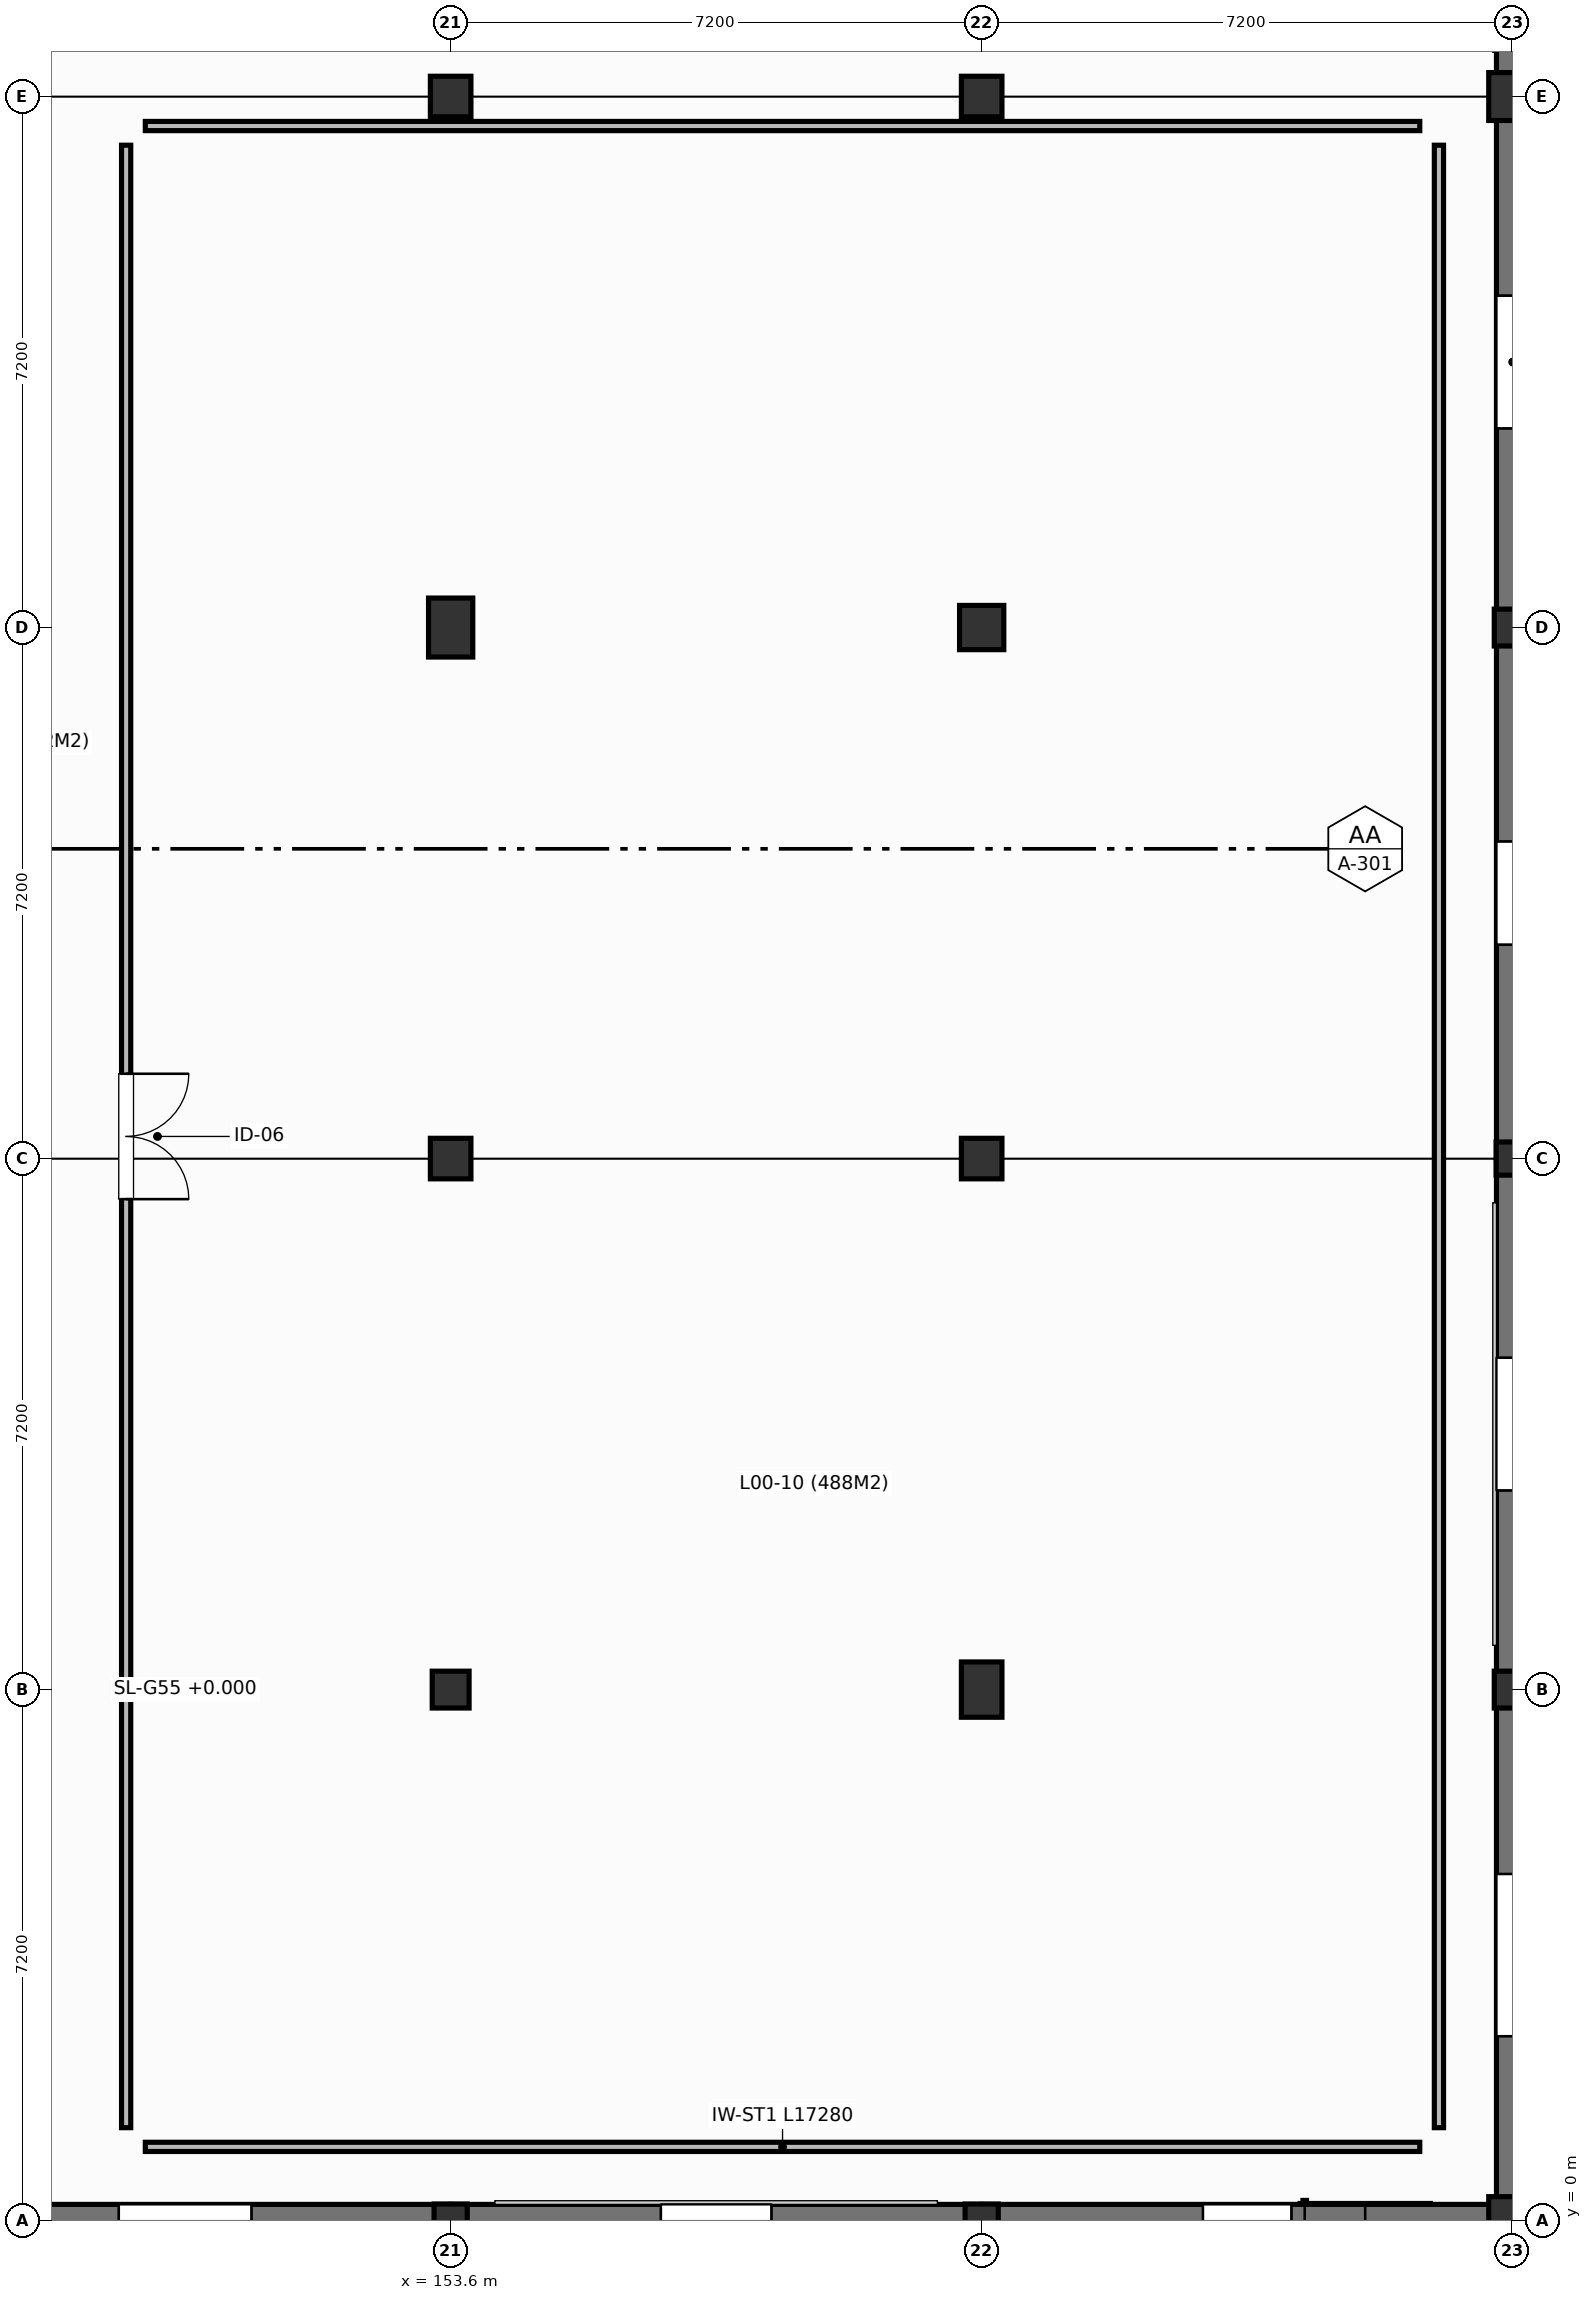
"""IFC4 building model, lengths in metres.
Left out: names, types, materials, properties, quantities, classifications, styles, units other than length and angle.
Written with IfcOpenShell. Run it as: python <this file> out.ifc"""

import sys

from ifc_helpers import new_model, si_unit, direction, frame, frame_2d, origin, origin_2d, place, context, subcontext, project, spatial, rectangle, circle, extrude, element, fill, save


model = new_model("IFC4")
c1 = context("Model", 3, precision=1e-05, world=origin(), true_north=direction((0.0, 1.0)))
c2 = subcontext(c1, "Body", "Model", "MODEL_VIEW")
j1 = project(units=[si_unit("LENGTHUNIT", "METRE"), si_unit("PLANEANGLEUNIT", "RADIAN")], contexts=[c1])
p1 = place(None, origin())
s1 = spatial("IfcSite", under=j1, at=p1, CompositionType="ELEMENT")
p2 = place(p1, origin())
s2 = spatial("IfcBuilding", under=s1, at=p2, CompositionType="ELEMENT")
p3 = place(p2, origin())
s3 = spatial("IfcBuildingStorey", under=s2, at=p3, CompositionType="ELEMENT", Elevation=0.0)
p4 = place(p3, frame((153.6, 0.0, 0.0), z_axis=(0.0, 0.0, 1.0), x_axis=(1.0, 0.0, 0.0)))
e1 = element("IfcColumn", 1, at=p4, inside=s3, PredefinedType="COLUMN", context=c2, shape_type="SweptSolid", body=[
    extrude(rectangle(XDim=0.45, YDim=0.45, at=origin_2d()), origin(), (0.0, 0.0, 1.0), 4.8),
])
p5 = place(p3, frame((153.6, 7.2, 0.0), z_axis=(0.0, 0.0, 1.0), x_axis=(1.0, 0.0, 0.0)))
e2 = element("IfcColumn", 2, at=p5, inside=s3, PredefinedType="COLUMN", context=c2, shape_type="SweptSolid", body=[
    extrude(rectangle(XDim=0.5, YDim=0.5, at=origin_2d()), origin(), (0.0, 0.0, 1.0), 4.8),
])
p6 = place(p3, frame((153.6, 14.4, 0.0), z_axis=(0.0, 0.0, 1.0), x_axis=(1.0, 0.0, 0.0)))
e3 = element("IfcColumn", 3, at=p6, inside=s3, PredefinedType="COLUMN", context=c2, shape_type="SweptSolid", body=[
    extrude(rectangle(XDim=0.55, YDim=0.55, at=origin_2d()), origin(), (0.0, 0.0, 1.0), 4.8),
])
p7 = place(p3, frame((153.6, 21.6, 0.0), z_axis=(0.0, 0.0, 1.0), x_axis=(1.0, 0.0, 0.0)))
e4 = element("IfcColumn", 4, at=p7, inside=s3, PredefinedType="COLUMN", context=c2, shape_type="SweptSolid", body=[
    extrude(rectangle(XDim=0.6, YDim=0.8, at=origin_2d()), origin(), (0.0, 0.0, 1.0), 4.8),
])
p8 = place(p3, frame((153.6, 28.8, 0.0), z_axis=(0.0, 0.0, 1.0), x_axis=(1.0, 0.0, 0.0)))
e5 = element("IfcColumn", 5, at=p8, inside=s3, PredefinedType="COLUMN", context=c2, shape_type="SweptSolid", body=[
    extrude(rectangle(XDim=0.55, YDim=0.55, at=origin_2d()), origin(), (0.0, 0.0, 1.0), 4.8),
])
p9 = place(p3, frame((160.8, 0.0, 0.0), z_axis=(0.0, 0.0, 1.0), x_axis=(1.0, 0.0, 0.0)))
e6 = element("IfcColumn", 6, at=p9, inside=s3, PredefinedType="COLUMN", context=c2, shape_type="SweptSolid", body=[
    extrude(rectangle(XDim=0.45, YDim=0.45, at=origin_2d()), origin(), (0.0, 0.0, 1.0), 4.8),
])
p10 = place(p3, frame((160.8, 7.2, 0.0), z_axis=(0.0, 0.0, 1.0), x_axis=(1.0, 0.0, 0.0)))
e7 = element("IfcColumn", 7, at=p10, inside=s3, PredefinedType="COLUMN", context=c2, shape_type="SweptSolid", body=[
    extrude(rectangle(XDim=0.55, YDim=0.75, at=origin_2d()), origin(), (0.0, 0.0, 1.0), 4.8),
])
p11 = place(p3, frame((160.8, 14.4, 0.0), z_axis=(0.0, 0.0, 1.0), x_axis=(1.0, 0.0, 0.0)))
e8 = element("IfcColumn", 8, at=p11, inside=s3, PredefinedType="COLUMN", context=c2, shape_type="SweptSolid", body=[
    extrude(rectangle(XDim=0.55, YDim=0.55, at=origin_2d()), origin(), (0.0, 0.0, 1.0), 4.8),
])
p12 = place(p3, frame((160.8, 21.6, 0.0), z_axis=(0.0, 0.0, 1.0), x_axis=(1.0, 0.0, 0.0)))
e9 = element("IfcColumn", 9, at=p12, inside=s3, PredefinedType="COLUMN", context=c2, shape_type="SweptSolid", body=[
    extrude(rectangle(XDim=0.6, YDim=0.6, at=origin_2d()), origin(), (0.0, 0.0, 1.0), 4.8),
])
p13 = place(p3, frame((160.8, 28.8, 0.0), z_axis=(0.0, 0.0, 1.0), x_axis=(1.0, 0.0, 0.0)))
e10 = element("IfcColumn", 10, at=p13, inside=s3, PredefinedType="COLUMN", context=c2, shape_type="SweptSolid", body=[
    extrude(rectangle(XDim=0.55, YDim=0.55, at=origin_2d()), origin(), (0.0, 0.0, 1.0), 4.8),
])
p14 = place(p3, frame((168.0, 0.0, 0.0), z_axis=(0.0, 0.0, 1.0), x_axis=(1.0, 0.0, 0.0)))
e11 = element("IfcColumn", 11, at=p14, inside=s3, PredefinedType="COLUMN", context=c2, shape_type="SweptSolid", body=[
    extrude(circle(Radius=0.325, at=origin_2d()), origin(), (0.0, 0.0, 1.0), 4.8),
])
p15 = place(p3, frame((168.0, 7.2, 0.0), z_axis=(0.0, 0.0, 1.0), x_axis=(1.0, 0.0, 0.0)))
e12 = element("IfcColumn", 12, at=p15, inside=s3, PredefinedType="COLUMN", context=c2, shape_type="SweptSolid", body=[
    extrude(rectangle(XDim=0.5, YDim=0.5, at=origin_2d()), origin(), (0.0, 0.0, 1.0), 4.8),
])
p16 = place(p3, frame((168.0, 14.4, 0.0), z_axis=(0.0, 0.0, 1.0), x_axis=(1.0, 0.0, 0.0)))
e13 = element("IfcColumn", 13, at=p16, inside=s3, PredefinedType="COLUMN", context=c2, shape_type="SweptSolid", body=[
    extrude(rectangle(XDim=0.45, YDim=0.45, at=origin_2d()), origin(), (0.0, 0.0, 1.0), 4.8),
])
p17 = place(p3, frame((168.0, 21.6, 0.0), z_axis=(0.0, 0.0, 1.0), x_axis=(1.0, 0.0, 0.0)))
e14 = element("IfcColumn", 14, at=p17, inside=s3, PredefinedType="COLUMN", context=c2, shape_type="SweptSolid", body=[
    extrude(rectangle(XDim=0.5, YDim=0.5, at=origin_2d()), origin(), (0.0, 0.0, 1.0), 4.8),
])
p18 = place(p3, frame((168.0, 28.8, 0.0), z_axis=(0.0, 0.0, 1.0), x_axis=(1.0, 0.0, 0.0)))
e15 = element("IfcColumn", 15, at=p18, inside=s3, PredefinedType="COLUMN", context=c2, shape_type="SweptSolid", body=[
    extrude(circle(Radius=0.325, at=origin_2d()), origin(), (0.0, 0.0, 1.0), 4.8),
])
p19 = place(p3, frame((168.0, 36.0, 0.0), z_axis=(0.0, 0.0, 1.0), x_axis=(0.0, -1.0, 0.0)))
e16 = element("IfcWall", 16, at=p19, inside=s3, PredefinedType="STANDARD", context=c2, shape_type="SweptSolid", body=[
    extrude(rectangle(XDim=7.2, YDim=0.44, at=frame_2d((3.6, 0.0))), origin(), (0.0, 0.0, 1.0), 4.44),
])
p20 = place(p19, frame((2.85, 0.0, 0.8)))
e17 = element("IfcOpeningElement", 17, at=p20, cuts=e16, PredefinedType="OPENING", context=c2, shape_type="SweptSolid", body=[
    extrude(rectangle(XDim=1.5, YDim=1.65, at=frame_2d((0.75, 0.825))), frame((0.0, 0.23, 0.0), z_axis=(0.0, -1.0, 0.0), x_axis=(1.0, 0.0, 0.0)), (0.0, 0.0, 1.0), 0.46),
])
p21 = place(p3, frame((168.0, 28.8, 0.0), z_axis=(0.0, 0.0, 1.0), x_axis=(0.0, -1.0, 0.0)))
e18 = element("IfcWall", 18, at=p21, inside=s3, PredefinedType="STANDARD", context=c2, shape_type="SweptSolid", body=[
    extrude(rectangle(XDim=7.2, YDim=0.44, at=frame_2d((3.6, 0.0))), origin(), (0.0, 0.0, 1.0), 4.44),
])
p22 = place(p21, frame((2.7, 0.0, 0.8)))
e19 = element("IfcOpeningElement", 19, at=p22, cuts=e18, PredefinedType="OPENING", context=c2, shape_type="SweptSolid", body=[
    extrude(rectangle(XDim=1.8, YDim=1.65, at=frame_2d((0.9, 0.825))), frame((0.0, 0.23, 0.0), z_axis=(0.0, -1.0, 0.0), x_axis=(1.0, 0.0, 0.0)), (0.0, 0.0, 1.0), 0.46),
])
p23 = place(p3, frame((168.0, 21.6, 0.0), z_axis=(0.0, 0.0, 1.0), x_axis=(0.0, -1.0, 0.0)))
e20 = element("IfcWall", 20, at=p23, inside=s3, PredefinedType="STANDARD", context=c2, shape_type="SweptSolid", body=[
    extrude(rectangle(XDim=7.2, YDim=0.44, at=frame_2d((3.6, 0.0))), origin(), (0.0, 0.0, 1.0), 4.44),
])
p24 = place(p23, frame((2.9, 0.0, 0.8)))
e21 = element("IfcOpeningElement", 21, at=p24, cuts=e20, PredefinedType="OPENING", context=c2, shape_type="SweptSolid", body=[
    extrude(rectangle(XDim=1.4, YDim=2.05, at=frame_2d((0.7, 1.025))), frame((0.0, 0.23, 0.0), z_axis=(0.0, -1.0, 0.0), x_axis=(1.0, 0.0, 0.0)), (0.0, 0.0, 1.0), 0.46),
])
p25 = place(p3, frame((168.0, 14.4, 0.0), z_axis=(0.0, 0.0, 1.0), x_axis=(0.0, -1.0, 0.0)))
e22 = element("IfcWall", 22, at=p25, inside=s3, PredefinedType="STANDARD", context=c2, shape_type="SweptSolid", body=[
    extrude(rectangle(XDim=7.2, YDim=0.44, at=frame_2d((3.6, 0.0))), origin(), (0.0, 0.0, 1.0), 4.44),
])
p26 = place(p25, frame((2.7, 0.0, 0.8)))
e23 = element("IfcOpeningElement", 23, at=p26, cuts=e22, PredefinedType="OPENING", context=c2, shape_type="SweptSolid", body=[
    extrude(rectangle(XDim=1.8, YDim=2.05, at=frame_2d((0.9, 1.025))), frame((0.0, 0.23, 0.0), z_axis=(0.0, -1.0, 0.0), x_axis=(1.0, 0.0, 0.0)), (0.0, 0.0, 1.0), 0.46),
])
p27 = place(p3, frame((168.0, 7.2, 0.0), z_axis=(0.0, 0.0, 1.0), x_axis=(0.0, -1.0, 0.0)))
e24 = element("IfcWall", 24, at=p27, inside=s3, PredefinedType="STANDARD", context=c2, shape_type="SweptSolid", body=[
    extrude(rectangle(XDim=7.2, YDim=0.44, at=frame_2d((3.6, 0.0))), origin(), (0.0, 0.0, 1.0), 4.44),
])
p28 = place(p27, frame((2.5, 0.0, 0.8)))
e25 = element("IfcOpeningElement", 25, at=p28, cuts=e24, PredefinedType="OPENING", context=c2, shape_type="SweptSolid", body=[
    extrude(rectangle(XDim=2.2, YDim=2.05, at=frame_2d((1.1, 1.025))), frame((0.0, 0.23, 0.0), z_axis=(0.0, -1.0, 0.0), x_axis=(1.0, 0.0, 0.0)), (0.0, 0.0, 1.0), 0.46),
])
p29 = place(p3, frame((168.0, 0.0, 0.0), z_axis=(0.0, 0.0, 1.0), x_axis=(-1.0, 0.0, 0.0)))
e26 = element("IfcWall", 26, at=p29, inside=s3, PredefinedType="STANDARD", context=c2, shape_type="SweptSolid", body=[
    extrude(rectangle(XDim=7.2, YDim=0.44, at=frame_2d((3.6, 0.0))), origin(), (0.0, 0.0, 1.0), 4.44),
])
p30 = place(p29, frame((3.0, 0.0, 0.8)))
e27 = element("IfcOpeningElement", 27, at=p30, cuts=e26, PredefinedType="OPENING", context=c2, shape_type="SweptSolid", body=[
    extrude(rectangle(XDim=1.2, YDim=1.65, at=frame_2d((0.6, 0.825))), frame((0.0, 0.23, 0.0), z_axis=(0.0, -1.0, 0.0), x_axis=(1.0, 0.0, 0.0)), (0.0, 0.0, 1.0), 0.46),
])
p31 = place(p3, frame((160.8, 0.0, 0.0), z_axis=(0.0, 0.0, 1.0), x_axis=(-1.0, 0.0, 0.0)))
e28 = element("IfcWall", 28, at=p31, inside=s3, PredefinedType="STANDARD", context=c2, shape_type="SweptSolid", body=[
    extrude(rectangle(XDim=7.2, YDim=0.44, at=frame_2d((3.6, 0.0))), origin(), (0.0, 0.0, 1.0), 4.44),
])
p32 = place(p31, frame((2.85, 0.0, 0.8)))
e29 = element("IfcOpeningElement", 29, at=p32, cuts=e28, PredefinedType="OPENING", context=c2, shape_type="SweptSolid", body=[
    extrude(rectangle(XDim=1.5, YDim=1.65, at=frame_2d((0.75, 0.825))), frame((0.0, 0.23, 0.0), z_axis=(0.0, -1.0, 0.0), x_axis=(1.0, 0.0, 0.0)), (0.0, 0.0, 1.0), 0.46),
])
p33 = place(p3, frame((153.6, 0.0, 0.0), z_axis=(0.0, 0.0, 1.0), x_axis=(-1.0, 0.0, 0.0)))
e30 = element("IfcWall", 30, at=p33, inside=s3, PredefinedType="STANDARD", context=c2, shape_type="SweptSolid", body=[
    extrude(rectangle(XDim=7.2, YDim=0.44, at=frame_2d((3.6, 0.0))), origin(), (0.0, 0.0, 1.0), 4.44),
])
p34 = place(p33, frame((2.7, 0.0, 0.8)))
e31 = element("IfcOpeningElement", 31, at=p34, cuts=e30, PredefinedType="OPENING", context=c2, shape_type="SweptSolid", body=[
    extrude(rectangle(XDim=1.8, YDim=1.65, at=frame_2d((0.9, 0.825))), frame((0.0, 0.23, 0.0), z_axis=(0.0, -1.0, 0.0), x_axis=(1.0, 0.0, 0.0)), (0.0, 0.0, 1.0), 0.46),
])
p35 = place(p3, frame((149.46, 1.0, 0.0), z_axis=(0.0, 0.0, 1.0), x_axis=(1.0, 0.0, 0.0)))
e32 = element("IfcWall", 32, at=p35, inside=s3, PredefinedType="PARTITIONING", context=c2, shape_type="SweptSolid", body=[
    extrude(rectangle(XDim=17.28, YDim=0.125, at=frame_2d((8.64, 0.0))), origin(), (0.0, 0.0, 1.0), 4.44),
])
p36 = place(p3, frame((167.0, 1.26, 0.0), z_axis=(0.0, 0.0, 1.0), x_axis=(0.0, 1.0, 0.0)))
e33 = element("IfcWall", 33, at=p36, inside=s3, PredefinedType="PARTITIONING", context=c2, shape_type="SweptSolid", body=[
    extrude(rectangle(XDim=26.88, YDim=0.125, at=frame_2d((13.44, 0.0))), origin(), (0.0, 0.0, 1.0), 4.44),
])
p37 = place(p3, frame((166.74, 28.4, 0.0), z_axis=(0.0, 0.0, 1.0), x_axis=(-1.0, 0.0, 0.0)))
e34 = element("IfcWall", 34, at=p37, inside=s3, PredefinedType="PARTITIONING", context=c2, shape_type="SweptSolid", body=[
    extrude(rectangle(XDim=17.28, YDim=0.125, at=frame_2d((8.64, 0.0))), origin(), (0.0, 0.0, 1.0), 3.515),
])
p38 = place(p3, frame((149.2, 28.14, 0.0), z_axis=(0.0, 0.0, 1.0), x_axis=(0.0, -1.0, 0.0)))
e35 = element("IfcWall", 35, at=p38, inside=s3, PredefinedType="PARTITIONING", context=c2, shape_type="SweptSolid", body=[
    extrude(rectangle(XDim=26.88, YDim=0.125, at=frame_2d((13.44, 0.0))), origin(), (0.0, 0.0, 1.0), 4.44),
])
p39 = place(p38, frame((12.59, 0.0, 0.0)))
e36 = element("IfcOpeningElement", 36, at=p39, cuts=e35, PredefinedType="OPENING", context=c2, shape_type="SweptSolid", body=[
    extrude(rectangle(XDim=1.7, YDim=2.2, at=frame_2d((0.85, 1.1))), frame((0.0, 0.073, 0.0), z_axis=(0.0, -1.0, 0.0), x_axis=(1.0, 0.0, 0.0)), (0.0, 0.0, 1.0), 0.145),
])
p40 = place(p22, origin())
e37 = element("IfcWindow", 37, at=p40, inside=s3, PartitioningType="SINGLE_PANEL", PredefinedType="WINDOW", context=c2, shape_type="SweptSolid", body=[
    extrude(rectangle(XDim=1.8, YDim=1.65, at=frame_2d((0.9, 0.825))), frame((0.0, 0.03, 0.0), z_axis=(0.0, -1.0, 0.0), x_axis=(1.0, 0.0, 0.0)), (0.0, 0.0, 1.0), 0.06),
])
fill(e19, e37)
p41 = place(p24, origin())
e38 = element("IfcWindow", 38, at=p41, inside=s3, PartitioningType="SINGLE_PANEL", PredefinedType="WINDOW", context=c2, shape_type="SweptSolid", body=[
    extrude(rectangle(XDim=1.4, YDim=2.05, at=frame_2d((0.7, 1.025))), frame((0.0, 0.03, 0.0), z_axis=(0.0, -1.0, 0.0), x_axis=(1.0, 0.0, 0.0)), (0.0, 0.0, 1.0), 0.06),
])
fill(e21, e38)
p42 = place(p26, origin())
e39 = element("IfcWindow", 39, at=p42, inside=s3, PartitioningType="SINGLE_PANEL", PredefinedType="WINDOW", context=c2, shape_type="SweptSolid", body=[
    extrude(rectangle(XDim=1.8, YDim=2.05, at=frame_2d((0.9, 1.025))), frame((0.0, 0.03, 0.0), z_axis=(0.0, -1.0, 0.0), x_axis=(1.0, 0.0, 0.0)), (0.0, 0.0, 1.0), 0.06),
])
fill(e23, e39)
p43 = place(p28, origin())
e40 = element("IfcWindow", 40, at=p43, inside=s3, PartitioningType="SINGLE_PANEL", PredefinedType="WINDOW", context=c2, shape_type="SweptSolid", body=[
    extrude(rectangle(XDim=2.2, YDim=2.05, at=frame_2d((1.1, 1.025))), frame((0.0, 0.03, 0.0), z_axis=(0.0, -1.0, 0.0), x_axis=(1.0, 0.0, 0.0)), (0.0, 0.0, 1.0), 0.06),
])
fill(e25, e40)
p44 = place(p30, origin())
e41 = element("IfcWindow", 41, at=p44, inside=s3, PartitioningType="SINGLE_PANEL", PredefinedType="WINDOW", context=c2, shape_type="SweptSolid", body=[
    extrude(rectangle(XDim=1.2, YDim=1.65, at=frame_2d((0.6, 0.825))), frame((0.0, 0.03, 0.0), z_axis=(0.0, -1.0, 0.0), x_axis=(1.0, 0.0, 0.0)), (0.0, 0.0, 1.0), 0.06),
])
fill(e27, e41)
p45 = place(p32, origin())
e42 = element("IfcWindow", 42, at=p45, inside=s3, PartitioningType="SINGLE_PANEL", PredefinedType="WINDOW", context=c2, shape_type="SweptSolid", body=[
    extrude(rectangle(XDim=1.5, YDim=1.65, at=frame_2d((0.75, 0.825))), frame((0.0, 0.03, 0.0), z_axis=(0.0, -1.0, 0.0), x_axis=(1.0, 0.0, 0.0)), (0.0, 0.0, 1.0), 0.06),
])
fill(e29, e42)
p46 = place(p34, origin())
e43 = element("IfcWindow", 43, at=p46, inside=s3, PartitioningType="SINGLE_PANEL", PredefinedType="WINDOW", context=c2, shape_type="SweptSolid", body=[
    extrude(rectangle(XDim=1.8, YDim=1.65, at=frame_2d((0.9, 0.825))), frame((0.0, 0.03, 0.0), z_axis=(0.0, -1.0, 0.0), x_axis=(1.0, 0.0, 0.0)), (0.0, 0.0, 1.0), 0.06),
])
fill(e31, e43)
p47 = place(p39, origin())
e44 = element("IfcDoor", 44, at=p47, inside=s3, OperationType="DOUBLE_DOOR_SINGLE_SWING", PredefinedType="DOOR", context=c2, shape_type="SweptSolid", body=[
    extrude(rectangle(XDim=1.7, YDim=2.2, at=frame_2d((0.85, 1.1))), frame((0.0, 0.025, 0.0), z_axis=(0.0, -1.0, 0.0), x_axis=(1.0, 0.0, 0.0)), (0.0, 0.0, 1.0), 0.05),
])
fill(e36, e44)
save(model, sys.argv[1])
